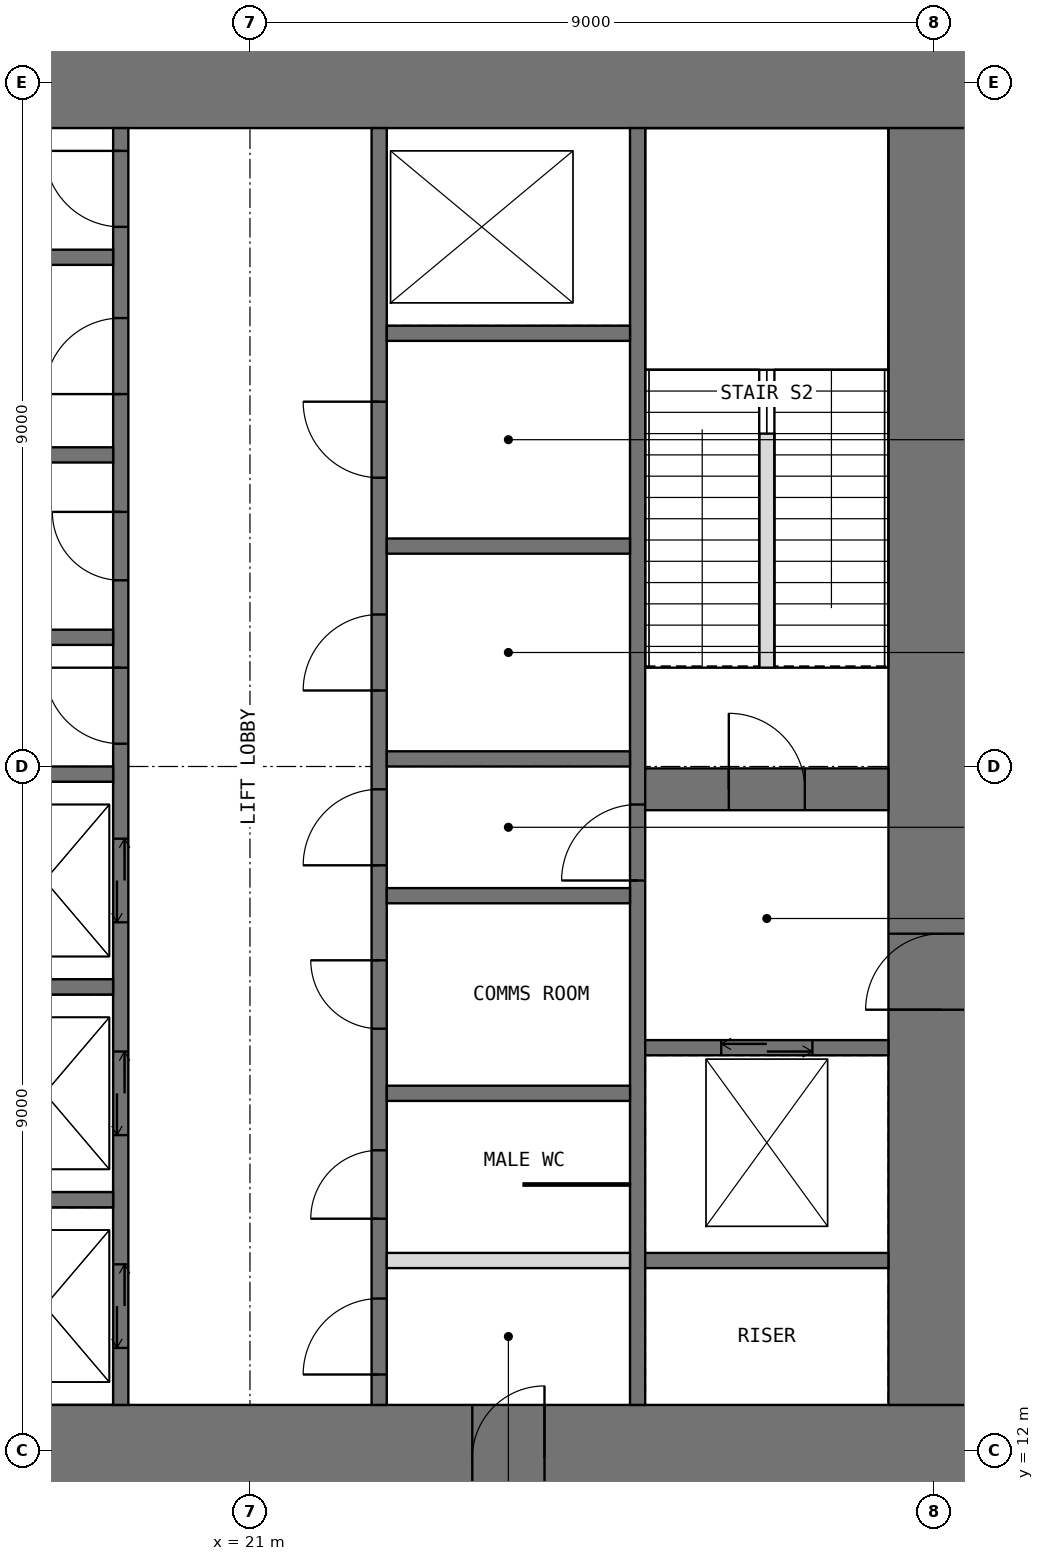
"""IFC4 building model, lengths in metres.
Left out: names, types, materials, properties, quantities, classifications, styles, units other than length and angle.
Written with IfcOpenShell. Run it as: python <this file> out.ifc"""

import sys

from ifc_helpers import new_model, si_unit, direction, frame, frame_2d, origin, place, context, subcontext, project, spatial, rectangle, extrude, element, fill, save


model = new_model("IFC4")
c1 = context("Model", 3, precision=1e-05, world=origin(), true_north=direction((0.0, 1.0)))
c2 = subcontext(c1, "Body", "Model", "MODEL_VIEW")
j1 = project(units=[si_unit("LENGTHUNIT", "METRE"), si_unit("PLANEANGLEUNIT", "RADIAN")], contexts=[c1])
p1 = place(None, origin())
s1 = spatial("IfcSite", under=j1, at=p1, CompositionType="ELEMENT")
p2 = place(p1, origin())
s2 = spatial("IfcBuilding", under=s1, at=p2, CompositionType="ELEMENT")
p3 = place(p2, frame((0.0, 0.0, 234.5)))
s3 = spatial("IfcBuildingStorey", under=s2, at=p3, CompositionType="ELEMENT", Elevation=234.5)
p4 = place(p3, frame((11.2, 11.9, -0.25), z_axis=(0.0, 0.0, 1.0), x_axis=(1.0, 0.0, 0.0)))
e1 = element("IfcWall", 1, at=p4, inside=s3, PredefinedType="SHEAR", context=c2, shape_type="SweptSolid", body=[
    extrude(rectangle(XDim=19.6, YDim=1.4, at=frame_2d((9.8, 0.0))), origin(), (0.0, 0.0, 1.0), 5.2),
])
p5 = place(p4, frame((12.725, 0.0, 0.25)))
e2 = element("IfcOpeningElement", 2, at=p5, cuts=e1, PredefinedType="OPENING", context=c2, shape_type="SweptSolid", body=[
    extrude(rectangle(XDim=0.95, YDim=2.4, at=frame_2d((0.475, 1.2))), frame((0.0, 0.71, 0.0), z_axis=(0.0, -1.0, 0.0), x_axis=(1.0, 0.0, 0.0)), (0.0, 0.0, 1.0), 1.42),
])
p6 = place(p3, frame((11.2, 30.1, -0.25), z_axis=(0.0, 0.0, 1.0), x_axis=(1.0, 0.0, 0.0)))
e3 = element("IfcWall", 3, at=p6, inside=s3, PredefinedType="SHEAR", context=c2, shape_type="SweptSolid", body=[
    extrude(rectangle(XDim=19.6, YDim=1.4, at=frame_2d((9.8, 0.0))), origin(), (0.0, 0.0, 1.0), 5.2),
])
p7 = place(p6, frame((5.925, 0.0, 0.25)))
e4 = element("IfcOpeningElement", 4, at=p7, cuts=e3, PredefinedType="OPENING", context=c2, shape_type="SweptSolid", body=[
    extrude(rectangle(XDim=0.95, YDim=2.4, at=frame_2d((0.475, 1.2))), frame((0.0, 0.71, 0.0), z_axis=(0.0, -1.0, 0.0), x_axis=(1.0, 0.0, 0.0)), (0.0, 0.0, 1.0), 1.42),
])
p8 = place(p3, frame((30.1, 12.6, -0.25), z_axis=(0.0, 0.0, 1.0), x_axis=(0.0, 1.0, 0.0)))
e5 = element("IfcWall", 5, at=p8, inside=s3, PredefinedType="SHEAR", context=c2, shape_type="SweptSolid", body=[
    extrude(rectangle(XDim=16.8, YDim=1.4, at=frame_2d((8.4, 0.0))), origin(), (0.0, 0.0, 1.0), 5.2),
])
p9 = place(p8, frame((5.2, 0.0, 0.25)))
e6 = element("IfcOpeningElement", 6, at=p9, cuts=e5, PredefinedType="OPENING", context=c2, shape_type="SweptSolid", body=[
    extrude(rectangle(XDim=1.0, YDim=2.2, at=frame_2d((0.5, 1.1))), frame((0.0, 0.71, 0.0), z_axis=(0.0, -1.0, 0.0), x_axis=(1.0, 0.0, 0.0)), (0.0, 0.0, 1.0), 1.42),
])
p10 = place(p3, frame((19.3, 12.6, -0.25), z_axis=(0.0, 0.0, 1.0), x_axis=(0.0, 1.0, 0.0)))
e7 = element("IfcWall", 7, at=p10, inside=s3, PredefinedType="SHEAR", context=c2, shape_type="SweptSolid", body=[
    extrude(rectangle(XDim=16.8, YDim=0.2, at=frame_2d((8.4, 0.0))), origin(), (0.0, 0.0, 1.0), 5.2),
])
p11 = place(p10, frame((8.7, 0.0, 0.25)))
e8 = element("IfcOpeningElement", 8, at=p11, cuts=e7, PredefinedType="OPENING", context=c2, shape_type="SweptSolid", body=[
    extrude(rectangle(XDim=1.0, YDim=2.2, at=frame_2d((0.5, 1.1))), frame((0.0, 0.11, 0.0), z_axis=(0.0, -1.0, 0.0), x_axis=(1.0, 0.0, 0.0)), (0.0, 0.0, 1.0), 0.22),
])
p12 = place(p10, frame((10.85, 0.0, 0.25)))
e9 = element("IfcOpeningElement", 9, at=p12, cuts=e7, PredefinedType="OPENING", context=c2, shape_type="SweptSolid", body=[
    extrude(rectangle(XDim=0.9, YDim=2.2, at=frame_2d((0.45, 1.1))), frame((0.0, 0.11, 0.0), z_axis=(0.0, -1.0, 0.0), x_axis=(1.0, 0.0, 0.0)), (0.0, 0.0, 1.0), 0.22),
])
p13 = place(p10, frame((13.3, 0.0, 0.25)))
e10 = element("IfcOpeningElement", 10, at=p13, cuts=e7, PredefinedType="OPENING", context=c2, shape_type="SweptSolid", body=[
    extrude(rectangle(XDim=1.0, YDim=2.2, at=frame_2d((0.5, 1.1))), frame((0.0, 0.11, 0.0), z_axis=(0.0, -1.0, 0.0), x_axis=(1.0, 0.0, 0.0)), (0.0, 0.0, 1.0), 0.22),
])
p14 = place(p10, frame((15.5, 0.0, 0.25)))
e11 = element("IfcOpeningElement", 11, at=p14, cuts=e7, PredefinedType="OPENING", context=c2, shape_type="SweptSolid", body=[
    extrude(rectangle(XDim=1.0, YDim=2.2, at=frame_2d((0.5, 1.1))), frame((0.0, 0.11, 0.0), z_axis=(0.0, -1.0, 0.0), x_axis=(1.0, 0.0, 0.0)), (0.0, 0.0, 1.0), 0.22),
])
p15 = place(p10, frame((0.75, 0.0, 0.25)))
e12 = element("IfcOpeningElement", 12, at=p15, cuts=e7, PredefinedType="OPENING", context=c2, shape_type="SweptSolid", body=[
    extrude(rectangle(XDim=1.1, YDim=2.2, at=frame_2d((0.55, 1.1))), frame((0.0, 0.11, 0.0), z_axis=(0.0, -1.0, 0.0), x_axis=(1.0, 0.0, 0.0)), (0.0, 0.0, 1.0), 0.22),
])
p16 = place(p10, frame((3.55, 0.0, 0.25)))
e13 = element("IfcOpeningElement", 13, at=p16, cuts=e7, PredefinedType="OPENING", context=c2, shape_type="SweptSolid", body=[
    extrude(rectangle(XDim=1.1, YDim=2.2, at=frame_2d((0.55, 1.1))), frame((0.0, 0.11, 0.0), z_axis=(0.0, -1.0, 0.0), x_axis=(1.0, 0.0, 0.0)), (0.0, 0.0, 1.0), 0.22),
])
p17 = place(p10, frame((6.35, 0.0, 0.25)))
e14 = element("IfcOpeningElement", 14, at=p17, cuts=e7, PredefinedType="OPENING", context=c2, shape_type="SweptSolid", body=[
    extrude(rectangle(XDim=1.1, YDim=2.2, at=frame_2d((0.55, 1.1))), frame((0.0, 0.11, 0.0), z_axis=(0.0, -1.0, 0.0), x_axis=(1.0, 0.0, 0.0)), (0.0, 0.0, 1.0), 0.22),
])
p18 = place(p3, frame((22.7, 12.6, -0.25), z_axis=(0.0, 0.0, 1.0), x_axis=(0.0, 1.0, 0.0)))
e15 = element("IfcWall", 15, at=p18, inside=s3, PredefinedType="SHEAR", context=c2, shape_type="SweptSolid", body=[
    extrude(rectangle(XDim=16.8, YDim=0.2, at=frame_2d((8.4, 0.0))), origin(), (0.0, 0.0, 1.0), 5.2),
])
p19 = place(p18, frame((0.4, 0.0, 0.25)))
e16 = element("IfcOpeningElement", 16, at=p19, cuts=e15, PredefinedType="OPENING", context=c2, shape_type="SweptSolid", body=[
    extrude(rectangle(XDim=1.0, YDim=2.2, at=frame_2d((0.5, 1.1))), frame((0.0, 0.11, 0.0), z_axis=(0.0, -1.0, 0.0), x_axis=(1.0, 0.0, 0.0)), (0.0, 0.0, 1.0), 0.22),
])
p20 = place(p18, frame((7.1, 0.0, 0.25)))
e17 = element("IfcOpeningElement", 17, at=p20, cuts=e15, PredefinedType="OPENING", context=c2, shape_type="SweptSolid", body=[
    extrude(rectangle(XDim=1.0, YDim=2.2, at=frame_2d((0.5, 1.1))), frame((0.0, 0.11, 0.0), z_axis=(0.0, -1.0, 0.0), x_axis=(1.0, 0.0, 0.0)), (0.0, 0.0, 1.0), 0.22),
])
p21 = place(p18, frame((2.45, 0.0, 0.25)))
e18 = element("IfcOpeningElement", 18, at=p21, cuts=e15, PredefinedType="OPENING", context=c2, shape_type="SweptSolid", body=[
    extrude(rectangle(XDim=0.9, YDim=2.2, at=frame_2d((0.45, 1.1))), frame((0.0, 0.11, 0.0), z_axis=(0.0, -1.0, 0.0), x_axis=(1.0, 0.0, 0.0)), (0.0, 0.0, 1.0), 0.22),
])
p22 = place(p18, frame((4.95, 0.0, 0.25)))
e19 = element("IfcOpeningElement", 19, at=p22, cuts=e15, PredefinedType="OPENING", context=c2, shape_type="SweptSolid", body=[
    extrude(rectangle(XDim=0.9, YDim=2.2, at=frame_2d((0.45, 1.1))), frame((0.0, 0.11, 0.0), z_axis=(0.0, -1.0, 0.0), x_axis=(1.0, 0.0, 0.0)), (0.0, 0.0, 1.0), 0.22),
])
p23 = place(p18, frame((9.4, 0.0, 0.25)))
e20 = element("IfcOpeningElement", 20, at=p23, cuts=e15, PredefinedType="OPENING", context=c2, shape_type="SweptSolid", body=[
    extrude(rectangle(XDim=1.0, YDim=2.2, at=frame_2d((0.5, 1.1))), frame((0.0, 0.11, 0.0), z_axis=(0.0, -1.0, 0.0), x_axis=(1.0, 0.0, 0.0)), (0.0, 0.0, 1.0), 0.22),
])
p24 = place(p18, frame((12.2, 0.0, 0.25)))
e21 = element("IfcOpeningElement", 21, at=p24, cuts=e15, PredefinedType="OPENING", context=c2, shape_type="SweptSolid", body=[
    extrude(rectangle(XDim=1.0, YDim=2.2, at=frame_2d((0.5, 1.1))), frame((0.0, 0.11, 0.0), z_axis=(0.0, -1.0, 0.0), x_axis=(1.0, 0.0, 0.0)), (0.0, 0.0, 1.0), 0.22),
])
p25 = place(p3, frame((26.1, 12.6, -0.25), z_axis=(0.0, 0.0, 1.0), x_axis=(0.0, 1.0, 0.0)))
e22 = element("IfcWall", 22, at=p25, inside=s3, PredefinedType="SHEAR", context=c2, shape_type="SweptSolid", body=[
    extrude(rectangle(XDim=16.8, YDim=0.2, at=frame_2d((8.4, 0.0))), origin(), (0.0, 0.0, 1.0), 5.2),
])
p26 = place(p25, frame((6.9, 0.0, 0.25)))
e23 = element("IfcOpeningElement", 23, at=p26, cuts=e22, PredefinedType="OPENING", context=c2, shape_type="SweptSolid", body=[
    extrude(rectangle(XDim=1.0, YDim=2.2, at=frame_2d((0.5, 1.1))), frame((0.0, 0.11, 0.0), z_axis=(0.0, -1.0, 0.0), x_axis=(1.0, 0.0, 0.0)), (0.0, 0.0, 1.0), 0.22),
])
for number, where, z_axis, x_axis in (
    (24, (16.0, 15.3, -0.25), (0.0, 0.0, 1.0), (1.0, 0.0, 0.0)),
    (25, (16.0, 18.1, -0.25), (0.0, 0.0, 1.0), (1.0, 0.0, 0.0)),
    (26, (16.0, 20.9, -0.25), (0.0, 0.0, 1.0), (1.0, 0.0, 0.0)),
    (27, (16.0, 22.7, -0.25), (0.0, 0.0, 1.0), (1.0, 0.0, 0.0)),
    (28, (16.0, 25.1, -0.25), (0.0, 0.0, 1.0), (1.0, 0.0, 0.0)),
    (29, (16.0, 27.7, -0.25), (0.0, 0.0, 1.0), (1.0, 0.0, 0.0)),
    (30, (22.8, 16.7, -0.25), (0.0, 0.0, 1.0), (1.0, 0.0, 0.0)),
    (31, (22.8, 19.3, -0.25), (0.0, 0.0, 1.0), (1.0, 0.0, 0.0)),
    (32, (22.8, 21.1, -0.25), (0.0, 0.0, 1.0), (1.0, 0.0, 0.0)),
    (33, (22.8, 23.9, -0.25), (0.0, 0.0, 1.0), (1.0, 0.0, 0.0)),
    (34, (22.8, 26.7, -0.25), (0.0, 0.0, 1.0), (1.0, 0.0, 0.0)),
    (35, (26.2, 14.5, -0.25), (0.0, 0.0, 1.0), (1.0, 0.0, 0.0)),
):
    element("IfcWall", number, at=place(p3, frame(where, z_axis=z_axis, x_axis=x_axis)), inside=s3, PredefinedType="SHEAR", context=c2, shape_type="SweptSolid", body=[
        extrude(rectangle(XDim=3.2, YDim=0.2, at=frame_2d((1.6, 0.0))), origin(), (0.0, 0.0, 1.0), 5.2),
    ])
p27 = place(p3, frame((26.2, 17.3, -0.25), z_axis=(0.0, 0.0, 1.0), x_axis=(1.0, 0.0, 0.0)))
e36 = element("IfcWall", 36, at=p27, inside=s3, PredefinedType="SHEAR", context=c2, shape_type="SweptSolid", body=[
    extrude(rectangle(XDim=3.2, YDim=0.2, at=frame_2d((1.6, 0.0))), origin(), (0.0, 0.0, 1.0), 5.2),
])
p28 = place(p27, frame((1.0, 0.0, 0.25)))
e37 = element("IfcOpeningElement", 37, at=p28, cuts=e36, PredefinedType="OPENING", context=c2, shape_type="SweptSolid", body=[
    extrude(rectangle(XDim=1.2, YDim=2.2, at=frame_2d((0.6, 1.1))), frame((0.0, 0.11, 0.0), z_axis=(0.0, -1.0, 0.0), x_axis=(1.0, 0.0, 0.0)), (0.0, 0.0, 1.0), 0.22),
])
p29 = place(p3, frame((26.2, 20.7, -0.25), z_axis=(0.0, 0.0, 1.0), x_axis=(1.0, 0.0, 0.0)))
e38 = element("IfcWall", 38, at=p29, inside=s3, PredefinedType="SHEAR", context=c2, shape_type="SweptSolid", body=[
    extrude(rectangle(XDim=3.2, YDim=0.55, at=frame_2d((1.6, 0.0))), origin(), (0.0, 0.0, 1.0), 5.2),
])
p30 = place(p29, frame((1.1, 0.0, 0.25)))
e39 = element("IfcOpeningElement", 39, at=p30, cuts=e38, PredefinedType="OPENING", context=c2, shape_type="SweptSolid", body=[
    extrude(rectangle(XDim=1.0, YDim=2.2, at=frame_2d((0.5, 1.1))), frame((0.0, 0.285, 0.0), z_axis=(0.0, -1.0, 0.0), x_axis=(1.0, 0.0, 0.0)), (0.0, 0.0, 1.0), 0.57),
])
p31 = place(p3, frame((22.8, 14.5, 0.0), z_axis=(0.0, 0.0, 1.0), x_axis=(1.0, 0.0, 0.0)))
e40 = element("IfcWall", 40, at=p31, inside=s3, PredefinedType="PARTITIONING", context=c2, shape_type="SweptSolid", body=[
    extrude(rectangle(XDim=3.2, YDim=0.2, at=frame_2d((1.6, 0.0))), origin(), (0.0, 0.0, 1.0), 4.75),
])
p32 = place(p3, frame((24.6, 15.5, 0.0), z_axis=(0.0, 0.0, 1.0), x_axis=(1.0, 0.0, 0.0)))
e41 = element("IfcWall", 41, at=p32, inside=s3, PredefinedType="PARTITIONING", context=c2, shape_type="SweptSolid", body=[
    extrude(rectangle(XDim=1.4, YDim=0.03, at=frame_2d((0.7, 0.0))), origin(), (0.0, 0.0, 1.0), 4.75),
])
p33 = place(p3, frame((27.8, 22.3, 0.0), z_axis=(0.0, 0.0, 1.0), x_axis=(0.0, 1.0, 0.0)))
e42 = element("IfcWall", 42, at=p33, inside=s3, PredefinedType="PARTITIONING", context=c2, shape_type="SweptSolid", body=[
    extrude(rectangle(XDim=3.08, YDim=0.2, at=frame_2d((1.54, 0.0))), origin(), (0.0, 0.0, 1.0), 5.0),
])
p34 = place(p19, origin())
e43 = element("IfcDoor", 43, at=p34, inside=s3, OperationType="SINGLE_SWING_LEFT", PredefinedType="DOOR", context=c2, shape_type="SweptSolid", body=[
    extrude(rectangle(XDim=1.0, YDim=2.2, at=frame_2d((0.5, 1.1))), frame((0.0, 0.025, 0.0), z_axis=(0.0, -1.0, 0.0), x_axis=(1.0, 0.0, 0.0)), (0.0, 0.0, 1.0), 0.05),
])
fill(e16, e43)
p35 = place(p5, origin())
e44 = element("IfcDoor", 44, at=p35, inside=s3, OperationType="SINGLE_SWING_RIGHT", PredefinedType="DOOR", context=c2, shape_type="SweptSolid", body=[
    extrude(rectangle(XDim=0.95, YDim=2.4, at=frame_2d((0.475, 1.2))), frame((0.0, -0.175, 0.0), z_axis=(0.0, -1.0, 0.0), x_axis=(1.0, 0.0, 0.0)), (0.0, 0.0, 1.0), 0.05),
])
fill(e2, e44)
p36 = place(p9, origin())
e45 = element("IfcDoor", 45, at=p36, inside=s3, OperationType="SINGLE_SWING_LEFT", PredefinedType="DOOR", context=c2, shape_type="SweptSolid", body=[
    extrude(rectangle(XDim=1.0, YDim=2.2, at=frame_2d((0.5, 1.1))), frame((0.0, -0.175, 0.0), z_axis=(0.0, -1.0, 0.0), x_axis=(1.0, 0.0, 0.0)), (0.0, 0.0, 1.0), 0.05),
])
fill(e6, e45)
p37 = place(p30, origin())
e46 = element("IfcDoor", 46, at=p37, inside=s3, OperationType="SINGLE_SWING_LEFT", PredefinedType="DOOR", context=c2, shape_type="SweptSolid", body=[
    extrude(rectangle(XDim=1.0, YDim=2.2, at=frame_2d((0.5, 1.1))), frame((0.0, 0.025, 0.0), z_axis=(0.0, -1.0, 0.0), x_axis=(1.0, 0.0, 0.0)), (0.0, 0.0, 1.0), 0.05),
])
fill(e39, e46)
p38 = place(p26, origin())
e47 = element("IfcDoor", 47, at=p38, inside=s3, OperationType="SINGLE_SWING_LEFT", PredefinedType="DOOR", context=c2, shape_type="SweptSolid", body=[
    extrude(rectangle(XDim=1.0, YDim=2.2, at=frame_2d((0.5, 1.1))), frame((0.0, 0.025, 0.0), z_axis=(0.0, -1.0, 0.0), x_axis=(1.0, 0.0, 0.0)), (0.0, 0.0, 1.0), 0.05),
])
fill(e23, e47)
p39 = place(p11, origin())
e48 = element("IfcDoor", 48, at=p39, inside=s3, OperationType="SINGLE_SWING_RIGHT", PredefinedType="DOOR", context=c2, shape_type="SweptSolid", body=[
    extrude(rectangle(XDim=1.0, YDim=2.2, at=frame_2d((0.5, 1.1))), frame((0.0, 0.025, 0.0), z_axis=(0.0, -1.0, 0.0), x_axis=(1.0, 0.0, 0.0)), (0.0, 0.0, 1.0), 0.05),
])
fill(e8, e48)
p40 = place(p20, origin())
e49 = element("IfcDoor", 49, at=p40, inside=s3, OperationType="SINGLE_SWING_LEFT", PredefinedType="DOOR", context=c2, shape_type="SweptSolid", body=[
    extrude(rectangle(XDim=1.0, YDim=2.2, at=frame_2d((0.5, 1.1))), frame((0.0, 0.025, 0.0), z_axis=(0.0, -1.0, 0.0), x_axis=(1.0, 0.0, 0.0)), (0.0, 0.0, 1.0), 0.05),
])
fill(e17, e49)
p41 = place(p12, origin())
e50 = element("IfcDoor", 50, at=p41, inside=s3, OperationType="SINGLE_SWING_RIGHT", PredefinedType="DOOR", context=c2, shape_type="SweptSolid", body=[
    extrude(rectangle(XDim=0.9, YDim=2.2, at=frame_2d((0.45, 1.1))), frame((0.0, 0.025, 0.0), z_axis=(0.0, -1.0, 0.0), x_axis=(1.0, 0.0, 0.0)), (0.0, 0.0, 1.0), 0.05),
])
fill(e9, e50)
p42 = place(p13, origin())
e51 = element("IfcDoor", 51, at=p42, inside=s3, OperationType="SINGLE_SWING_LEFT", PredefinedType="DOOR", context=c2, shape_type="SweptSolid", body=[
    extrude(rectangle(XDim=1.0, YDim=2.2, at=frame_2d((0.5, 1.1))), frame((0.0, 0.025, 0.0), z_axis=(0.0, -1.0, 0.0), x_axis=(1.0, 0.0, 0.0)), (0.0, 0.0, 1.0), 0.05),
])
fill(e10, e51)
p43 = place(p14, origin())
e52 = element("IfcDoor", 52, at=p43, inside=s3, OperationType="SINGLE_SWING_RIGHT", PredefinedType="DOOR", context=c2, shape_type="SweptSolid", body=[
    extrude(rectangle(XDim=1.0, YDim=2.2, at=frame_2d((0.5, 1.1))), frame((0.0, 0.025, 0.0), z_axis=(0.0, -1.0, 0.0), x_axis=(1.0, 0.0, 0.0)), (0.0, 0.0, 1.0), 0.05),
])
fill(e11, e52)
p44 = place(p21, origin())
e53 = element("IfcDoor", 53, at=p44, inside=s3, OperationType="SINGLE_SWING_LEFT", PredefinedType="DOOR", context=c2, shape_type="SweptSolid", body=[
    extrude(rectangle(XDim=0.9, YDim=2.2, at=frame_2d((0.45, 1.1))), frame((0.0, 0.025, 0.0), z_axis=(0.0, -1.0, 0.0), x_axis=(1.0, 0.0, 0.0)), (0.0, 0.0, 1.0), 0.05),
])
fill(e18, e53)
p45 = place(p22, origin())
e54 = element("IfcDoor", 54, at=p45, inside=s3, OperationType="SINGLE_SWING_RIGHT", PredefinedType="DOOR", context=c2, shape_type="SweptSolid", body=[
    extrude(rectangle(XDim=0.9, YDim=2.2, at=frame_2d((0.45, 1.1))), frame((0.0, 0.025, 0.0), z_axis=(0.0, -1.0, 0.0), x_axis=(1.0, 0.0, 0.0)), (0.0, 0.0, 1.0), 0.05),
])
fill(e19, e54)
p46 = place(p23, origin())
e55 = element("IfcDoor", 55, at=p46, inside=s3, OperationType="SINGLE_SWING_LEFT", PredefinedType="DOOR", context=c2, shape_type="SweptSolid", body=[
    extrude(rectangle(XDim=1.0, YDim=2.2, at=frame_2d((0.5, 1.1))), frame((0.0, 0.025, 0.0), z_axis=(0.0, -1.0, 0.0), x_axis=(1.0, 0.0, 0.0)), (0.0, 0.0, 1.0), 0.05),
])
fill(e20, e55)
p47 = place(p24, origin())
e56 = element("IfcDoor", 56, at=p47, inside=s3, OperationType="SINGLE_SWING_RIGHT", PredefinedType="DOOR", context=c2, shape_type="SweptSolid", body=[
    extrude(rectangle(XDim=1.0, YDim=2.2, at=frame_2d((0.5, 1.1))), frame((0.0, 0.025, 0.0), z_axis=(0.0, -1.0, 0.0), x_axis=(1.0, 0.0, 0.0)), (0.0, 0.0, 1.0), 0.05),
])
fill(e21, e56)
p48 = place(p15, origin())
e57 = element("IfcDoor", 57, at=p48, inside=s3, OperationType="DOUBLE_DOOR_SLIDING", PredefinedType="DOOR", context=c2, shape_type="SweptSolid", body=[
    extrude(rectangle(XDim=1.1, YDim=2.2, at=frame_2d((0.55, 1.1))), frame((0.0, 0.025, 0.0), z_axis=(0.0, -1.0, 0.0), x_axis=(1.0, 0.0, 0.0)), (0.0, 0.0, 1.0), 0.05),
])
fill(e12, e57)
p49 = place(p16, origin())
e58 = element("IfcDoor", 58, at=p49, inside=s3, OperationType="DOUBLE_DOOR_SLIDING", PredefinedType="DOOR", context=c2, shape_type="SweptSolid", body=[
    extrude(rectangle(XDim=1.1, YDim=2.2, at=frame_2d((0.55, 1.1))), frame((0.0, 0.025, 0.0), z_axis=(0.0, -1.0, 0.0), x_axis=(1.0, 0.0, 0.0)), (0.0, 0.0, 1.0), 0.05),
])
fill(e13, e58)
p50 = place(p17, origin())
e59 = element("IfcDoor", 59, at=p50, inside=s3, OperationType="DOUBLE_DOOR_SLIDING", PredefinedType="DOOR", context=c2, shape_type="SweptSolid", body=[
    extrude(rectangle(XDim=1.1, YDim=2.2, at=frame_2d((0.55, 1.1))), frame((0.0, 0.025, 0.0), z_axis=(0.0, -1.0, 0.0), x_axis=(1.0, 0.0, 0.0)), (0.0, 0.0, 1.0), 0.05),
])
fill(e14, e59)
p51 = place(p28, origin())
e60 = element("IfcDoor", 60, at=p51, inside=s3, OperationType="DOUBLE_DOOR_SLIDING", PredefinedType="DOOR", context=c2, shape_type="SweptSolid", body=[
    extrude(rectangle(XDim=1.2, YDim=2.2, at=frame_2d((0.6, 1.1))), frame((0.0, 0.025, 0.0), z_axis=(0.0, -1.0, 0.0), x_axis=(1.0, 0.0, 0.0)), (0.0, 0.0, 1.0), 0.05),
])
fill(e37, e60)
save(model, sys.argv[1])
